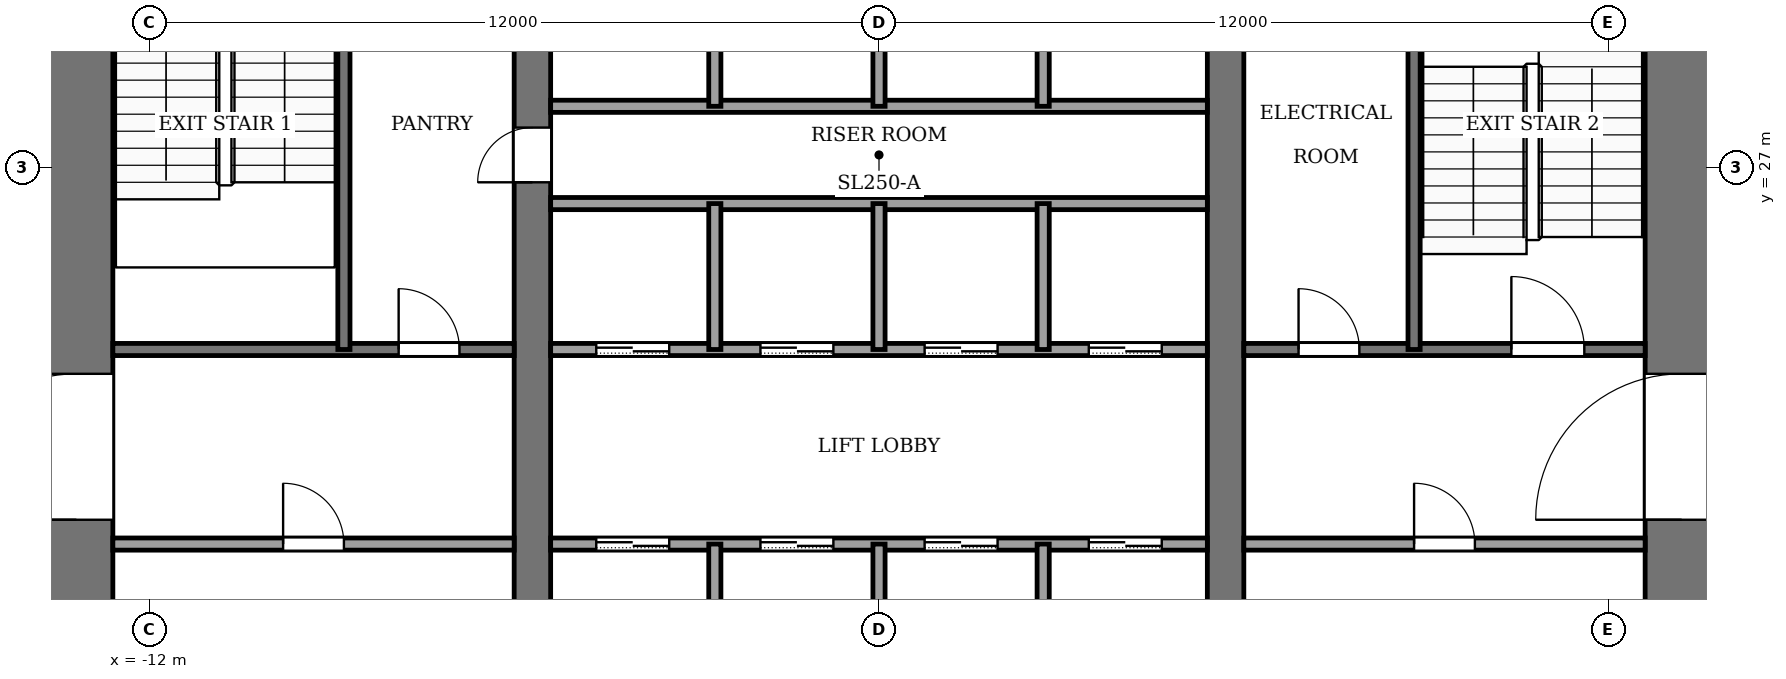
"""IFC4 building model, lengths in metres.
Left out: names, types, materials, properties, quantities, classifications, styles, units other than length and angle.
Written with IfcOpenShell. Run it as: python <this file> out.ifc"""

import sys

from ifc_helpers import new_model, si_unit, direction, frame, frame_2d, origin, place, context, subcontext, project, spatial, rectangle, extrude, element, fill, save


model = new_model("IFC4")
c1 = context("Model", 3, precision=1e-05, world=origin(), true_north=direction((0.0, 1.0)))
c2 = subcontext(c1, "Body", "Model", "MODEL_VIEW")
j1 = project(units=[si_unit("LENGTHUNIT", "METRE"), si_unit("PLANEANGLEUNIT", "RADIAN")], contexts=[c1])
p1 = place(None, origin())
s1 = spatial("IfcSite", under=j1, at=p1, CompositionType="ELEMENT")
p2 = place(p1, origin())
s2 = spatial("IfcBuilding", under=s1, at=p2, CompositionType="ELEMENT")
p3 = place(p2, frame((0.0, 0.0, 82.0)))
s3 = spatial("IfcBuildingStorey", under=s2, at=p3, CompositionType="ELEMENT", Elevation=82.0)
p4 = place(p3, frame((-13.2, 18.4, -0.13), z_axis=(0.0, 0.0, 1.0), x_axis=(0.0, 1.0, 0.0)))
e1 = element("IfcWall", 1, at=p4, inside=s3, PredefinedType="SHEAR", context=c2, shape_type="SweptSolid", body=[
    extrude(rectangle(XDim=19.2, YDim=1.2, at=frame_2d((9.6, 0.0))), origin(), (0.0, 0.0, 1.0), 4.0),
])
p5 = place(p4, frame((2.8, 0.0, 0.13)))
e2 = element("IfcOpeningElement", 2, at=p5, cuts=e1, PredefinedType="OPENING", context=c2, shape_type="SweptSolid", body=[
    extrude(rectangle(XDim=2.4, YDim=2.4, at=frame_2d((1.2, 1.2))), frame((0.0, 0.61, 0.0), z_axis=(0.0, -1.0, 0.0), x_axis=(1.0, 0.0, 0.0)), (0.0, 0.0, 1.0), 1.22),
])
p6 = place(p4, frame((13.4, 0.0, 0.13)))
e3 = element("IfcOpeningElement", 3, at=p6, cuts=e1, PredefinedType="OPENING", context=c2, shape_type="SweptSolid", body=[
    extrude(rectangle(XDim=1.4, YDim=2.2, at=frame_2d((0.7, 1.1))), frame((0.0, 0.61, 0.0), z_axis=(0.0, -1.0, 0.0), x_axis=(1.0, 0.0, 0.0)), (0.0, 0.0, 1.0), 1.22),
])
p7 = place(p3, frame((13.2, 18.4, -0.13), z_axis=(0.0, 0.0, 1.0), x_axis=(0.0, 1.0, 0.0)))
e4 = element("IfcWall", 4, at=p7, inside=s3, PredefinedType="SHEAR", context=c2, shape_type="SweptSolid", body=[
    extrude(rectangle(XDim=19.2, YDim=1.2, at=frame_2d((9.6, 0.0))), origin(), (0.0, 0.0, 1.0), 4.0),
])
p8 = place(p7, frame((2.8, 0.0, 0.13)))
e5 = element("IfcOpeningElement", 5, at=p8, cuts=e4, PredefinedType="OPENING", context=c2, shape_type="SweptSolid", body=[
    extrude(rectangle(XDim=2.4, YDim=2.4, at=frame_2d((1.2, 1.2))), frame((0.0, 0.61, 0.0), z_axis=(0.0, -1.0, 0.0), x_axis=(1.0, 0.0, 0.0)), (0.0, 0.0, 1.0), 1.22),
])
p9 = place(p7, frame((13.3, 0.0, 0.13)))
e6 = element("IfcOpeningElement", 6, at=p9, cuts=e4, PredefinedType="OPENING", context=c2, shape_type="SweptSolid", body=[
    extrude(rectangle(XDim=2.4, YDim=2.4, at=frame_2d((1.2, 1.2))), frame((0.0, 0.61, 0.0), z_axis=(0.0, -1.0, 0.0), x_axis=(1.0, 0.0, 0.0)), (0.0, 0.0, 1.0), 1.22),
])
p10 = place(p3, frame((-5.7, 18.4, -0.13), z_axis=(0.0, 0.0, 1.0), x_axis=(0.0, 1.0, 0.0)))
e7 = element("IfcWall", 7, at=p10, inside=s3, PredefinedType="SHEAR", context=c2, shape_type="SweptSolid", body=[
    extrude(rectangle(XDim=19.2, YDim=0.6, at=frame_2d((9.6, 0.0))), origin(), (0.0, 0.0, 1.0), 4.0),
])
p11 = place(p10, frame((8.35, 0.0, 0.13)))
e8 = element("IfcOpeningElement", 8, at=p11, cuts=e7, PredefinedType="OPENING", context=c2, shape_type="SweptSolid", body=[
    extrude(rectangle(XDim=0.9, YDim=2.1, at=frame_2d((0.45, 1.05))), frame((0.0, 0.31, 0.0), z_axis=(0.0, -1.0, 0.0), x_axis=(1.0, 0.0, 0.0)), (0.0, 0.0, 1.0), 0.62),
])
p12 = place(p3, frame((5.7, 18.4, -0.13), z_axis=(0.0, 0.0, 1.0), x_axis=(0.0, 1.0, 0.0)))
e9 = element("IfcWall", 9, at=p12, inside=s3, PredefinedType="SHEAR", context=c2, shape_type="SweptSolid", body=[
    extrude(rectangle(XDim=19.2, YDim=0.6, at=frame_2d((9.6, 0.0))), origin(), (0.0, 0.0, 1.0), 4.0),
])
p13 = place(p12, frame((13.3, 0.0, 0.13)))
e10 = element("IfcOpeningElement", 10, at=p13, cuts=e9, PredefinedType="OPENING", context=c2, shape_type="SweptSolid", body=[
    extrude(rectangle(XDim=2.4, YDim=2.4, at=frame_2d((1.2, 1.2))), frame((0.0, 0.31, 0.0), z_axis=(0.0, -1.0, 0.0), x_axis=(1.0, 0.0, 0.0)), (0.0, 0.0, 1.0), 0.62),
])
p14 = place(p3, frame((-12.6, 20.8, 0.0), z_axis=(0.0, 0.0, 1.0), x_axis=(1.0, 0.0, 0.0)))
e11 = element("IfcWall", 11, at=p14, inside=s3, PredefinedType="PARTITIONING", context=c2, shape_type="SweptSolid", body=[
    extrude(rectangle(XDim=6.6, YDim=0.2, at=frame_2d((3.3, 0.0))), origin(), (0.0, 0.0, 1.0), 3.87),
])
p15 = place(p14, frame((2.8, 0.0, 0.0)))
e12 = element("IfcOpeningElement", 12, at=p15, cuts=e11, PredefinedType="OPENING", context=c2, shape_type="SweptSolid", body=[
    extrude(rectangle(XDim=1.0, YDim=2.1, at=frame_2d((0.5, 1.05))), frame((0.0, 0.11, 0.0), z_axis=(0.0, -1.0, 0.0), x_axis=(1.0, 0.0, 0.0)), (0.0, 0.0, 1.0), 0.22),
])
p16 = place(p3, frame((-5.4, 20.8, 0.0), z_axis=(0.0, 0.0, 1.0), x_axis=(1.0, 0.0, 0.0)))
e13 = element("IfcWall", 13, at=p16, inside=s3, PredefinedType="PARTITIONING", context=c2, shape_type="SweptSolid", body=[
    extrude(rectangle(XDim=10.8, YDim=0.2, at=frame_2d((5.4, 0.0))), origin(), (0.0, 0.0, 1.0), 3.87),
])
p17 = place(p16, frame((0.75, 0.0, 0.0)))
e14 = element("IfcOpeningElement", 14, at=p17, cuts=e13, PredefinedType="OPENING", context=c2, shape_type="SweptSolid", body=[
    extrude(rectangle(XDim=1.2, YDim=2.2, at=frame_2d((0.6, 1.1))), frame((0.0, 0.11, 0.0), z_axis=(0.0, -1.0, 0.0), x_axis=(1.0, 0.0, 0.0)), (0.0, 0.0, 1.0), 0.22),
])
p18 = place(p16, frame((3.45, 0.0, 0.0)))
e15 = element("IfcOpeningElement", 15, at=p18, cuts=e13, PredefinedType="OPENING", context=c2, shape_type="SweptSolid", body=[
    extrude(rectangle(XDim=1.2, YDim=2.2, at=frame_2d((0.6, 1.1))), frame((0.0, 0.11, 0.0), z_axis=(0.0, -1.0, 0.0), x_axis=(1.0, 0.0, 0.0)), (0.0, 0.0, 1.0), 0.22),
])
p19 = place(p16, frame((6.15, 0.0, 0.0)))
e16 = element("IfcOpeningElement", 16, at=p19, cuts=e13, PredefinedType="OPENING", context=c2, shape_type="SweptSolid", body=[
    extrude(rectangle(XDim=1.2, YDim=2.2, at=frame_2d((0.6, 1.1))), frame((0.0, 0.11, 0.0), z_axis=(0.0, -1.0, 0.0), x_axis=(1.0, 0.0, 0.0)), (0.0, 0.0, 1.0), 0.22),
])
p20 = place(p16, frame((8.85, 0.0, 0.0)))
e17 = element("IfcOpeningElement", 17, at=p20, cuts=e13, PredefinedType="OPENING", context=c2, shape_type="SweptSolid", body=[
    extrude(rectangle(XDim=1.2, YDim=2.2, at=frame_2d((0.6, 1.1))), frame((0.0, 0.11, 0.0), z_axis=(0.0, -1.0, 0.0), x_axis=(1.0, 0.0, 0.0)), (0.0, 0.0, 1.0), 0.22),
])
p21 = place(p3, frame((6.0, 20.8, 0.0), z_axis=(0.0, 0.0, 1.0), x_axis=(1.0, 0.0, 0.0)))
e18 = element("IfcWall", 18, at=p21, inside=s3, PredefinedType="PARTITIONING", context=c2, shape_type="SweptSolid", body=[
    extrude(rectangle(XDim=6.6, YDim=0.2, at=frame_2d((3.3, 0.0))), origin(), (0.0, 0.0, 1.0), 3.87),
])
p22 = place(p21, frame((2.8, 0.0, 0.0)))
e19 = element("IfcOpeningElement", 19, at=p22, cuts=e18, PredefinedType="OPENING", context=c2, shape_type="SweptSolid", body=[
    extrude(rectangle(XDim=1.0, YDim=2.1, at=frame_2d((0.5, 1.05))), frame((0.0, 0.11, 0.0), z_axis=(0.0, -1.0, 0.0), x_axis=(1.0, 0.0, 0.0)), (0.0, 0.0, 1.0), 0.22),
])
p23 = place(p3, frame((-12.6, 24.0, 0.0), z_axis=(0.0, 0.0, 1.0), x_axis=(1.0, 0.0, 0.0)))
e20 = element("IfcWall", 20, at=p23, inside=s3, PredefinedType="PARTITIONING", context=c2, shape_type="SweptSolid", body=[
    extrude(rectangle(XDim=6.6, YDim=0.2, at=frame_2d((3.3, 0.0))), origin(), (0.0, 0.0, 1.0), 3.87),
])
p24 = place(p23, frame((4.7, 0.0, 0.0)))
e21 = element("IfcOpeningElement", 21, at=p24, cuts=e20, PredefinedType="OPENING", context=c2, shape_type="SweptSolid", body=[
    extrude(rectangle(XDim=1.0, YDim=2.1, at=frame_2d((0.5, 1.05))), frame((0.0, 0.11, 0.0), z_axis=(0.0, -1.0, 0.0), x_axis=(1.0, 0.0, 0.0)), (0.0, 0.0, 1.0), 0.22),
])
p25 = place(p3, frame((-5.4, 24.0, 0.0), z_axis=(0.0, 0.0, 1.0), x_axis=(1.0, 0.0, 0.0)))
e22 = element("IfcWall", 22, at=p25, inside=s3, PredefinedType="PARTITIONING", context=c2, shape_type="SweptSolid", body=[
    extrude(rectangle(XDim=10.8, YDim=0.2, at=frame_2d((5.4, 0.0))), origin(), (0.0, 0.0, 1.0), 3.87),
])
p26 = place(p25, frame((0.75, 0.0, 0.0)))
e23 = element("IfcOpeningElement", 23, at=p26, cuts=e22, PredefinedType="OPENING", context=c2, shape_type="SweptSolid", body=[
    extrude(rectangle(XDim=1.2, YDim=2.2, at=frame_2d((0.6, 1.1))), frame((0.0, 0.11, 0.0), z_axis=(0.0, -1.0, 0.0), x_axis=(1.0, 0.0, 0.0)), (0.0, 0.0, 1.0), 0.22),
])
p27 = place(p25, frame((3.45, 0.0, 0.0)))
e24 = element("IfcOpeningElement", 24, at=p27, cuts=e22, PredefinedType="OPENING", context=c2, shape_type="SweptSolid", body=[
    extrude(rectangle(XDim=1.2, YDim=2.2, at=frame_2d((0.6, 1.1))), frame((0.0, 0.11, 0.0), z_axis=(0.0, -1.0, 0.0), x_axis=(1.0, 0.0, 0.0)), (0.0, 0.0, 1.0), 0.22),
])
p28 = place(p25, frame((6.15, 0.0, 0.0)))
e25 = element("IfcOpeningElement", 25, at=p28, cuts=e22, PredefinedType="OPENING", context=c2, shape_type="SweptSolid", body=[
    extrude(rectangle(XDim=1.2, YDim=2.2, at=frame_2d((0.6, 1.1))), frame((0.0, 0.11, 0.0), z_axis=(0.0, -1.0, 0.0), x_axis=(1.0, 0.0, 0.0)), (0.0, 0.0, 1.0), 0.22),
])
p29 = place(p25, frame((8.85, 0.0, 0.0)))
e26 = element("IfcOpeningElement", 26, at=p29, cuts=e22, PredefinedType="OPENING", context=c2, shape_type="SweptSolid", body=[
    extrude(rectangle(XDim=1.2, YDim=2.2, at=frame_2d((0.6, 1.1))), frame((0.0, 0.11, 0.0), z_axis=(0.0, -1.0, 0.0), x_axis=(1.0, 0.0, 0.0)), (0.0, 0.0, 1.0), 0.22),
])
p30 = place(p3, frame((6.0, 24.0, 0.0), z_axis=(0.0, 0.0, 1.0), x_axis=(1.0, 0.0, 0.0)))
e27 = element("IfcWall", 27, at=p30, inside=s3, PredefinedType="PARTITIONING", context=c2, shape_type="SweptSolid", body=[
    extrude(rectangle(XDim=6.6, YDim=0.2, at=frame_2d((3.3, 0.0))), origin(), (0.0, 0.0, 1.0), 3.87),
])
p31 = place(p30, frame((0.9, 0.0, 0.0)))
e28 = element("IfcOpeningElement", 28, at=p31, cuts=e27, PredefinedType="OPENING", context=c2, shape_type="SweptSolid", body=[
    extrude(rectangle(XDim=1.0, YDim=2.1, at=frame_2d((0.5, 1.05))), frame((0.0, 0.11, 0.0), z_axis=(0.0, -1.0, 0.0), x_axis=(1.0, 0.0, 0.0)), (0.0, 0.0, 1.0), 0.22),
])
p32 = place(p30, frame((4.4, 0.0, 0.0)))
e29 = element("IfcOpeningElement", 29, at=p32, cuts=e27, PredefinedType="OPENING", context=c2, shape_type="SweptSolid", body=[
    extrude(rectangle(XDim=1.2, YDim=2.2, at=frame_2d((0.6, 1.1))), frame((0.0, 0.11, 0.0), z_axis=(0.0, -1.0, 0.0), x_axis=(1.0, 0.0, 0.0)), (0.0, 0.0, 1.0), 0.22),
])
for number, where, z_axis, x_axis in (
    (30, (-5.4, 26.4, 0.0), (0.0, 0.0, 1.0), (1.0, 0.0, 0.0)),
    (31, (-5.4, 28.0, 0.0), (0.0, 0.0, 1.0), (1.0, 0.0, 0.0)),
):
    element("IfcWall", number, at=place(p3, frame(where, z_axis=z_axis, x_axis=x_axis)), inside=s3, PredefinedType="PARTITIONING", context=c2, shape_type="SweptSolid", body=[
        extrude(rectangle(XDim=10.8, YDim=0.2, at=frame_2d((5.4, 0.0))), origin(), (0.0, 0.0, 1.0), 3.87),
    ])
p33 = place(p3, frame((-8.8, 24.0, 0.0), z_axis=(0.0, 0.0, 1.0), x_axis=(0.0, 1.0, 0.0)))
e32 = element("IfcWall", 32, at=p33, inside=s3, PredefinedType="PARTITIONING", context=c2, shape_type="SweptSolid", body=[
    extrude(rectangle(XDim=7.4, YDim=0.2, at=frame_2d((3.7, 0.0))), origin(), (0.0, 0.0, 1.0), 3.87),
])
p34 = place(p3, frame((-2.7, 18.4, 0.0), z_axis=(0.0, 0.0, 1.0), x_axis=(0.0, 1.0, 0.0)))
e33 = element("IfcWall", 33, at=p34, inside=s3, PredefinedType="PARTITIONING", context=c2, shape_type="SweptSolid", body=[
    extrude(rectangle(XDim=2.4, YDim=0.2, at=frame_2d((1.2, 0.0))), origin(), (0.0, 0.0, 1.0), 3.87),
])
for number, where, z_axis, x_axis in (
    (34, (-2.7, 24.0, 0.0), (0.0, 0.0, 1.0), (0.0, 1.0, 0.0)),
    (35, (-2.7, 28.0, 0.0), (0.0, 0.0, 1.0), (0.0, 1.0, 0.0)),
):
    element("IfcWall", number, at=place(p3, frame(where, z_axis=z_axis, x_axis=x_axis)), inside=s3, PredefinedType="PARTITIONING", context=c2, shape_type="SweptSolid", body=[
        extrude(rectangle(XDim=2.4, YDim=0.2, at=frame_2d((1.2, 0.0))), origin(), (0.0, 0.0, 1.0), 3.87),
    ])
p35 = place(p3, frame((0.0, 18.4, 0.0), z_axis=(0.0, 0.0, 1.0), x_axis=(0.0, 1.0, 0.0)))
e36 = element("IfcWall", 36, at=p35, inside=s3, PredefinedType="PARTITIONING", context=c2, shape_type="SweptSolid", body=[
    extrude(rectangle(XDim=2.4, YDim=0.2, at=frame_2d((1.2, 0.0))), origin(), (0.0, 0.0, 1.0), 3.87),
])
for number, where, z_axis, x_axis in (
    (37, (0.0, 24.0, 0.0), (0.0, 0.0, 1.0), (0.0, 1.0, 0.0)),
    (38, (0.0, 28.0, 0.0), (0.0, 0.0, 1.0), (0.0, 1.0, 0.0)),
):
    element("IfcWall", number, at=place(p3, frame(where, z_axis=z_axis, x_axis=x_axis)), inside=s3, PredefinedType="PARTITIONING", context=c2, shape_type="SweptSolid", body=[
        extrude(rectangle(XDim=2.4, YDim=0.2, at=frame_2d((1.2, 0.0))), origin(), (0.0, 0.0, 1.0), 3.87),
    ])
p36 = place(p3, frame((2.7, 18.4, 0.0), z_axis=(0.0, 0.0, 1.0), x_axis=(0.0, 1.0, 0.0)))
e39 = element("IfcWall", 39, at=p36, inside=s3, PredefinedType="PARTITIONING", context=c2, shape_type="SweptSolid", body=[
    extrude(rectangle(XDim=2.4, YDim=0.2, at=frame_2d((1.2, 0.0))), origin(), (0.0, 0.0, 1.0), 3.87),
])
for number, where, z_axis, x_axis in (
    (40, (2.7, 24.0, 0.0), (0.0, 0.0, 1.0), (0.0, 1.0, 0.0)),
    (41, (2.7, 28.0, 0.0), (0.0, 0.0, 1.0), (0.0, 1.0, 0.0)),
):
    element("IfcWall", number, at=place(p3, frame(where, z_axis=z_axis, x_axis=x_axis)), inside=s3, PredefinedType="PARTITIONING", context=c2, shape_type="SweptSolid", body=[
        extrude(rectangle(XDim=2.4, YDim=0.2, at=frame_2d((1.2, 0.0))), origin(), (0.0, 0.0, 1.0), 3.87),
    ])
p37 = place(p3, frame((8.8, 24.0, 0.0), z_axis=(0.0, 0.0, 1.0), x_axis=(0.0, 1.0, 0.0)))
e42 = element("IfcWall", 42, at=p37, inside=s3, PredefinedType="PARTITIONING", context=c2, shape_type="SweptSolid", body=[
    extrude(rectangle(XDim=7.4, YDim=0.2, at=frame_2d((3.7, 0.0))), origin(), (0.0, 0.0, 1.0), 3.87),
])
p38 = place(p17, origin())
e43 = element("IfcDoor", 43, at=p38, inside=s3, OperationType="SLIDING_TO_LEFT", PredefinedType="DOOR", context=c2, shape_type="SweptSolid", body=[
    extrude(rectangle(XDim=1.2, YDim=2.2, at=frame_2d((0.6, 1.1))), frame((0.0, 0.025, 0.0), z_axis=(0.0, -1.0, 0.0), x_axis=(1.0, 0.0, 0.0)), (0.0, 0.0, 1.0), 0.05),
])
fill(e14, e43)
p39 = place(p18, origin())
e44 = element("IfcDoor", 44, at=p39, inside=s3, OperationType="SLIDING_TO_LEFT", PredefinedType="DOOR", context=c2, shape_type="SweptSolid", body=[
    extrude(rectangle(XDim=1.2, YDim=2.2, at=frame_2d((0.6, 1.1))), frame((0.0, 0.025, 0.0), z_axis=(0.0, -1.0, 0.0), x_axis=(1.0, 0.0, 0.0)), (0.0, 0.0, 1.0), 0.05),
])
fill(e15, e44)
p40 = place(p19, origin())
e45 = element("IfcDoor", 45, at=p40, inside=s3, OperationType="SLIDING_TO_LEFT", PredefinedType="DOOR", context=c2, shape_type="SweptSolid", body=[
    extrude(rectangle(XDim=1.2, YDim=2.2, at=frame_2d((0.6, 1.1))), frame((0.0, 0.025, 0.0), z_axis=(0.0, -1.0, 0.0), x_axis=(1.0, 0.0, 0.0)), (0.0, 0.0, 1.0), 0.05),
])
fill(e16, e45)
p41 = place(p20, origin())
e46 = element("IfcDoor", 46, at=p41, inside=s3, OperationType="SLIDING_TO_LEFT", PredefinedType="DOOR", context=c2, shape_type="SweptSolid", body=[
    extrude(rectangle(XDim=1.2, YDim=2.2, at=frame_2d((0.6, 1.1))), frame((0.0, 0.025, 0.0), z_axis=(0.0, -1.0, 0.0), x_axis=(1.0, 0.0, 0.0)), (0.0, 0.0, 1.0), 0.05),
])
fill(e17, e46)
p42 = place(p26, origin())
e47 = element("IfcDoor", 47, at=p42, inside=s3, OperationType="SLIDING_TO_LEFT", PredefinedType="DOOR", context=c2, shape_type="SweptSolid", body=[
    extrude(rectangle(XDim=1.2, YDim=2.2, at=frame_2d((0.6, 1.1))), frame((0.0, 0.025, 0.0), z_axis=(0.0, -1.0, 0.0), x_axis=(1.0, 0.0, 0.0)), (0.0, 0.0, 1.0), 0.05),
])
fill(e23, e47)
p43 = place(p27, origin())
e48 = element("IfcDoor", 48, at=p43, inside=s3, OperationType="SLIDING_TO_LEFT", PredefinedType="DOOR", context=c2, shape_type="SweptSolid", body=[
    extrude(rectangle(XDim=1.2, YDim=2.2, at=frame_2d((0.6, 1.1))), frame((0.0, 0.025, 0.0), z_axis=(0.0, -1.0, 0.0), x_axis=(1.0, 0.0, 0.0)), (0.0, 0.0, 1.0), 0.05),
])
fill(e24, e48)
p44 = place(p28, origin())
e49 = element("IfcDoor", 49, at=p44, inside=s3, OperationType="SLIDING_TO_LEFT", PredefinedType="DOOR", context=c2, shape_type="SweptSolid", body=[
    extrude(rectangle(XDim=1.2, YDim=2.2, at=frame_2d((0.6, 1.1))), frame((0.0, 0.025, 0.0), z_axis=(0.0, -1.0, 0.0), x_axis=(1.0, 0.0, 0.0)), (0.0, 0.0, 1.0), 0.05),
])
fill(e25, e49)
p45 = place(p29, origin())
e50 = element("IfcDoor", 50, at=p45, inside=s3, OperationType="SLIDING_TO_LEFT", PredefinedType="DOOR", context=c2, shape_type="SweptSolid", body=[
    extrude(rectangle(XDim=1.2, YDim=2.2, at=frame_2d((0.6, 1.1))), frame((0.0, 0.025, 0.0), z_axis=(0.0, -1.0, 0.0), x_axis=(1.0, 0.0, 0.0)), (0.0, 0.0, 1.0), 0.05),
])
fill(e26, e50)
p46 = place(p15, origin())
e51 = element("IfcDoor", 51, at=p46, inside=s3, OperationType="SINGLE_SWING_LEFT", PredefinedType="DOOR", context=c2, shape_type="SweptSolid", body=[
    extrude(rectangle(XDim=1.0, YDim=2.1, at=frame_2d((0.5, 1.05))), frame((0.0, 0.025, 0.0), z_axis=(0.0, -1.0, 0.0), x_axis=(1.0, 0.0, 0.0)), (0.0, 0.0, 1.0), 0.05),
])
fill(e12, e51)
p47 = place(p22, origin())
e52 = element("IfcDoor", 52, at=p47, inside=s3, OperationType="SINGLE_SWING_RIGHT", PredefinedType="DOOR", context=c2, shape_type="SweptSolid", body=[
    extrude(rectangle(XDim=1.0, YDim=2.1, at=frame_2d((0.5, 1.05))), frame((0.0, 0.025, 0.0), z_axis=(0.0, -1.0, 0.0), x_axis=(1.0, 0.0, 0.0)), (0.0, 0.0, 1.0), 0.05),
])
fill(e19, e52)
p48 = place(p24, origin())
e53 = element("IfcDoor", 53, at=p48, inside=s3, OperationType="SINGLE_SWING_RIGHT", PredefinedType="DOOR", context=c2, shape_type="SweptSolid", body=[
    extrude(rectangle(XDim=1.0, YDim=2.1, at=frame_2d((0.5, 1.05))), frame((0.0, 0.025, 0.0), z_axis=(0.0, -1.0, 0.0), x_axis=(1.0, 0.0, 0.0)), (0.0, 0.0, 1.0), 0.05),
])
fill(e21, e53)
p49 = place(p31, origin())
e54 = element("IfcDoor", 54, at=p49, inside=s3, OperationType="SINGLE_SWING_LEFT", PredefinedType="DOOR", context=c2, shape_type="SweptSolid", body=[
    extrude(rectangle(XDim=1.0, YDim=2.1, at=frame_2d((0.5, 1.05))), frame((0.0, 0.025, 0.0), z_axis=(0.0, -1.0, 0.0), x_axis=(1.0, 0.0, 0.0)), (0.0, 0.0, 1.0), 0.05),
])
fill(e28, e54)
p50 = place(p11, origin())
e55 = element("IfcDoor", 55, at=p50, inside=s3, OperationType="SINGLE_SWING_RIGHT", PredefinedType="DOOR", context=c2, shape_type="SweptSolid", body=[
    extrude(rectangle(XDim=0.9, YDim=2.1, at=frame_2d((0.45, 1.05))), frame((0.0, 0.025, 0.0), z_axis=(0.0, -1.0, 0.0), x_axis=(1.0, 0.0, 0.0)), (0.0, 0.0, 1.0), 0.05),
])
fill(e8, e55)
p51 = place(p32, origin())
e56 = element("IfcDoor", 56, at=p51, inside=s3, OperationType="SINGLE_SWING_LEFT", PredefinedType="DOOR", context=c2, shape_type="SweptSolid", body=[
    extrude(rectangle(XDim=1.2, YDim=2.2, at=frame_2d((0.6, 1.1))), frame((0.0, 0.025, 0.0), z_axis=(0.0, -1.0, 0.0), x_axis=(1.0, 0.0, 0.0)), (0.0, 0.0, 1.0), 0.05),
])
fill(e29, e56)
p52 = place(p5, origin())
e57 = element("IfcDoor", 57, at=p52, inside=s3, OperationType="DOUBLE_DOOR_SINGLE_SWING", PredefinedType="DOOR", context=c2, shape_type="SweptSolid", body=[
    extrude(rectangle(XDim=2.4, YDim=2.4, at=frame_2d((1.2, 1.2))), frame((0.0, 0.025, 0.0), z_axis=(0.0, -1.0, 0.0), x_axis=(1.0, 0.0, 0.0)), (0.0, 0.0, 1.0), 0.05),
])
fill(e2, e57)
p53 = place(p8, origin())
e58 = element("IfcDoor", 58, at=p53, inside=s3, OperationType="DOUBLE_DOOR_SINGLE_SWING", PredefinedType="DOOR", context=c2, shape_type="SweptSolid", body=[
    extrude(rectangle(XDim=2.4, YDim=2.4, at=frame_2d((1.2, 1.2))), frame((0.0, 0.025, 0.0), z_axis=(0.0, -1.0, 0.0), x_axis=(1.0, 0.0, 0.0)), (0.0, 0.0, 1.0), 0.05),
])
fill(e5, e58)
save(model, sys.argv[1])
